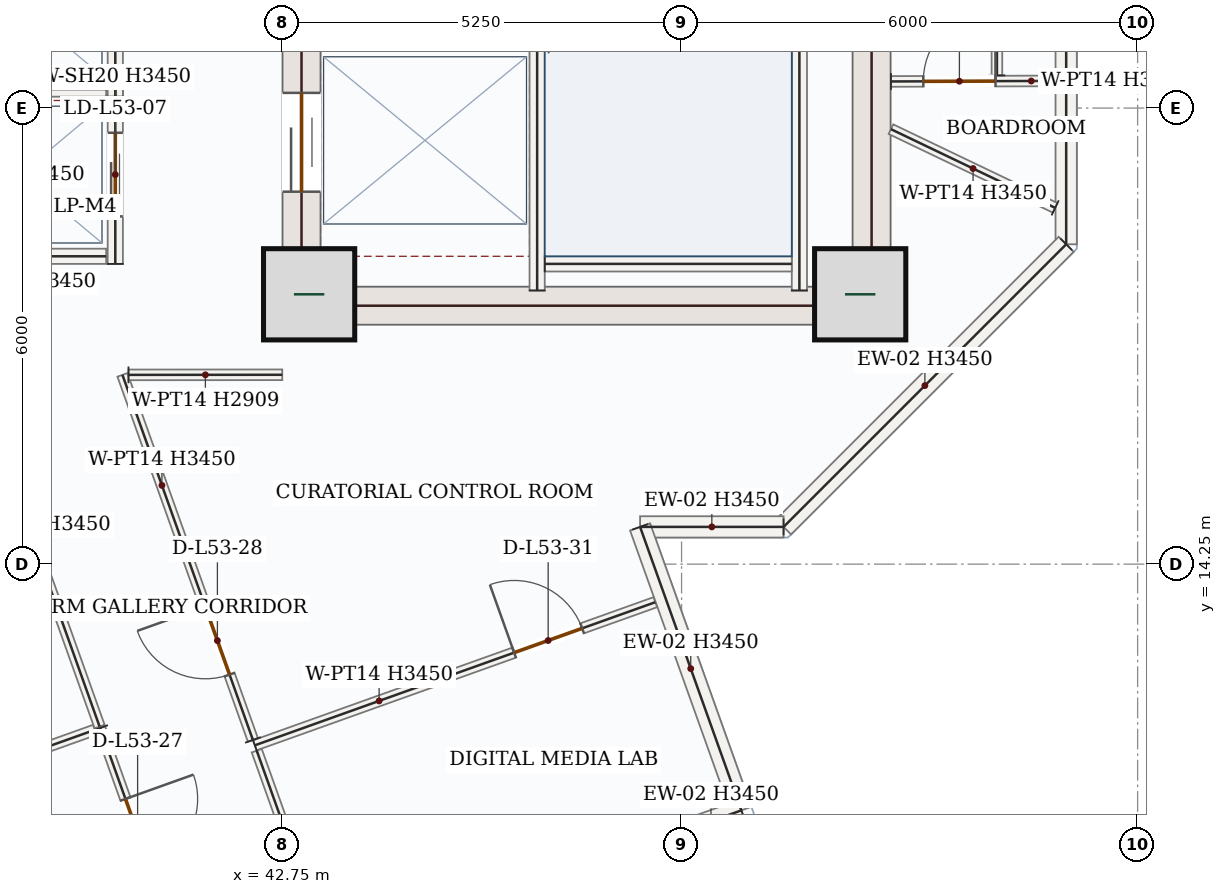
"""IFC4 building model, lengths in metres.
Left out: names, types, materials, properties, quantities, classifications, styles, units other than length and angle.
Written with IfcOpenShell. Run it as: python <this file> out.ifc"""

import sys

from ifc_helpers import new_model, si_unit, direction, frame, frame_2d, origin, origin_2d, place, context, subcontext, project, spatial, rectangle, extrude, source, transform, mapped, element, fill, save


model = new_model("IFC4")
c1 = context("Model", 3, precision=1e-05, world=origin(), true_north=direction((0.0, 1.0)))
c2 = subcontext(c1, "Body", "Model", "MODEL_VIEW")
j1 = project(units=[si_unit("LENGTHUNIT", "METRE"), si_unit("PLANEANGLEUNIT", "RADIAN")], contexts=[c1])
p1 = place(None, origin())
s1 = spatial("IfcSite", under=j1, at=p1, CompositionType="ELEMENT")
p2 = place(p1, origin())
s2 = spatial("IfcBuilding", under=s1, at=p2, CompositionType="ELEMENT")
p3 = place(p2, frame((0.0, 0.0, 225.3)))
s3 = spatial("IfcBuildingStorey", under=s2, at=p3, CompositionType="ELEMENT", Elevation=225.3)
p4 = place(p3, frame((43.0, 17.4, 0.0), z_axis=(0.0, 0.0, 1.0), x_axis=(0.0, 1.0, 0.0)))
e1 = element("IfcWall", 1, at=p4, inside=s3, PredefinedType="SHEAR", context=c2, shape_type="SweptSolid", body=[
    extrude(rectangle(XDim=8.55, YDim=0.5, at=frame_2d((4.275, 0.0))), origin(), (0.0, 0.0, 1.0), 3.45),
])
p5 = place(p4, frame((6.65, 0.0, 0.0)))
e2 = element("IfcOpeningElement", 2, at=p5, cuts=e1, PredefinedType="OPENING", context=c2, shape_type="SweptSolid", body=[
    extrude(rectangle(XDim=1.1, YDim=2.2, at=frame_2d((0.55, 1.1))), frame((0.0, 0.26, 0.0), z_axis=(0.0, -1.0, 0.0), x_axis=(1.0, 0.0, 0.0)), (0.0, 0.0, 1.0), 0.52),
])
p6 = place(p4, frame((1.75, 0.0, 0.0)))
e3 = element("IfcOpeningElement", 3, at=p6, cuts=e1, PredefinedType="OPENING", context=c2, shape_type="SweptSolid", body=[
    extrude(rectangle(XDim=1.3, YDim=2.2, at=frame_2d((0.65, 1.1))), frame((0.0, 0.26, 0.0), z_axis=(0.0, -1.0, 0.0), x_axis=(1.0, 0.0, 0.0)), (0.0, 0.0, 1.0), 0.52),
])
p7 = place(p4, frame((4.55, 0.0, 0.0)))
e4 = element("IfcOpeningElement", 4, at=p7, cuts=e1, PredefinedType="OPENING", context=c2, shape_type="SweptSolid", body=[
    extrude(rectangle(XDim=0.88, YDim=2.1, at=frame_2d((0.44, 1.05))), frame((0.0, 0.26, 0.0), z_axis=(0.0, -1.0, 0.0), x_axis=(1.0, 0.0, 0.0)), (0.0, 0.0, 1.0), 0.52),
])
m1 = source(origin(), c2, "Body", "SweptSolid", [
    extrude(rectangle(XDim=8.55, YDim=0.5, at=frame_2d((4.275, 0.0))), origin(), (0.0, 0.0, 1.0), 3.45),
])
p8 = place(p3, frame((50.5, 17.4, 0.0), z_axis=(0.0, 0.0, 1.0), x_axis=(0.0, 1.0, 0.0)))
e5 = element("IfcWall", 5, at=p8, inside=s3, PredefinedType="SHEAR", context=c2, shape_type="MappedRepresentation", body=[
    mapped(m1, transform((0.0, 0.0, 0.0), x_axis=(1.0, 0.0, 0.0), y_axis=(0.0, 1.0, 0.0), z_axis=(0.0, 0.0, 1.0), scale=1.0)),
])
m2 = source(origin(), c2, "Body", "SweptSolid", [
    extrude(rectangle(XDim=7.0, YDim=0.5, at=frame_2d((3.5, 0.0))), origin(), (0.0, 0.0, 1.0), 3.45),
])
p9 = place(p3, frame((43.25, 17.65, 0.0), z_axis=(0.0, 0.0, 1.0), x_axis=(1.0, 0.0, 0.0)))
e6 = element("IfcWall", 6, at=p9, inside=s3, PredefinedType="SHEAR", context=c2, shape_type="MappedRepresentation", body=[
    mapped(m2, transform((0.0, 0.0, 0.0), x_axis=(1.0, 0.0, 0.0), y_axis=(0.0, 1.0, 0.0), z_axis=(0.0, 0.0, 1.0), scale=1.0)),
])
m3 = source(origin(), c2, "Body", "SweptSolid", [
    extrude(rectangle(XDim=1.2, YDim=1.2, at=origin_2d()), origin(), (0.0, 0.0, 1.0), 3.9),
])
for number, where, z_axis, x_axis in (
    (7, (43.1, 17.8, 0.0), (0.0, 0.0, 1.0), (1.0, 0.0, 0.0)),
    (8, (50.35, 17.8, 0.0), (0.0, 0.0, 1.0), (1.0, 0.0, 0.0)),
):
    element("IfcColumn", number, at=place(p3, frame(where, z_axis=z_axis, x_axis=x_axis)), inside=s3, PredefinedType="COLUMN", context=c2, shape_type="MappedRepresentation", body=[
        mapped(m3, transform((0.0, 0.0, 0.0), x_axis=(1.0, 0.0, 0.0), y_axis=(0.0, 1.0, 0.0), z_axis=(0.0, 0.0, 1.0), scale=1.0)),
    ])
m4 = source(origin(), c2, "Body", "SweptSolid", [
    extrude(rectangle(XDim=7.567, YDim=0.28, at=frame_2d((3.783, 0.0))), origin(), (0.0, 0.0, 1.0), 3.45),
])
p10 = place(p3, frame((53.06, 26.025, 0.0), z_axis=(0.0, 0.0, 1.0), x_axis=(0.0, -1.0, 0.0)))
e9 = element("IfcWall", 9, at=p10, inside=s3, PredefinedType="SOLIDWALL", context=c2, shape_type="MappedRepresentation", body=[
    mapped(m4, transform((0.0, 0.0, 0.0), x_axis=(1.0, 0.0, 0.0), y_axis=(0.0, 1.0, 0.0), z_axis=(0.0, 0.0, 1.0), scale=1.0)),
])
m5 = source(origin(), c2, "Body", "SweptSolid", [
    extrude(rectangle(XDim=5.258, YDim=0.28, at=frame_2d((2.629, 0.0))), origin(), (0.0, 0.0, 1.0), 3.45),
])
p11 = place(p3, frame((53.06, 18.458, 0.0), z_axis=(0.0, 0.0, 1.0), x_axis=(-0.707106781187, -0.707106781187, 0.0)))
e10 = element("IfcWall", 10, at=p11, inside=s3, PredefinedType="SOLIDWALL", context=c2, shape_type="MappedRepresentation", body=[
    mapped(m5, transform((0.0, 0.0, 0.0), x_axis=(1.0, 0.0, 0.0), y_axis=(0.0, 1.0, 0.0), z_axis=(0.0, 0.0, 1.0), scale=1.0)),
])
m6 = source(origin(), c2, "Body", "SweptSolid", [
    extrude(rectangle(XDim=1.888, YDim=0.28, at=frame_2d((0.944, 0.0))), origin(), (0.0, 0.0, 1.0), 3.45),
])
p12 = place(p3, frame((49.342, 14.74, 0.0), z_axis=(0.0, 0.0, 1.0), x_axis=(-1.0, 0.0, 0.0)))
e11 = element("IfcWall", 11, at=p12, inside=s3, PredefinedType="SOLIDWALL", context=c2, shape_type="MappedRepresentation", body=[
    mapped(m6, transform((0.0, 0.0, 0.0), x_axis=(1.0, 0.0, 0.0), y_axis=(0.0, 1.0, 0.0), z_axis=(0.0, 0.0, 1.0), scale=1.0)),
])
m7 = source(origin(), c2, "Body", "SweptSolid", [
    extrude(rectangle(XDim=3.96, YDim=0.28, at=frame_2d((1.98, 0.0))), origin(), (0.0, 0.0, 1.0), 3.45),
])
p13 = place(p3, frame((47.454, 14.74, 0.0), z_axis=(0.0, 0.0, 1.0), x_axis=(0.336590223561, -0.941651220677, 0.0)))
e12 = element("IfcWall", 12, at=p13, inside=s3, PredefinedType="SOLIDWALL", context=c2, shape_type="MappedRepresentation", body=[
    mapped(m7, transform((0.0, 0.0, 0.0), x_axis=(1.0, 0.0, 0.0), y_axis=(0.0, 1.0, 0.0), z_axis=(0.0, 0.0, 1.0), scale=1.0)),
])
m8 = source(origin(), c2, "Body", "SweptSolid", [
    extrude(rectangle(XDim=0.85, YDim=0.28, at=frame_2d((0.425, 0.0))), origin(), (0.0, 0.0, 1.0), 3.45),
])
p14 = place(p3, frame((48.787, 11.011, 0.0), z_axis=(0.0, 0.0, 1.0), x_axis=(-0.941657417713, -0.336572886112, 0.0)))
e13 = element("IfcWall", 13, at=p14, inside=s3, PredefinedType="SOLIDWALL", context=c2, shape_type="MappedRepresentation", body=[
    mapped(m8, transform((0.0, 0.0, 0.0), x_axis=(1.0, 0.0, 0.0), y_axis=(0.0, 1.0, 0.0), z_axis=(0.0, 0.0, 1.0), scale=1.0)),
])
m9 = source(origin(), c2, "Body", "SweptSolid", [
    extrude(rectangle(XDim=7.87, YDim=0.2, at=frame_2d((3.935, 0.0))), origin(), (0.0, 0.0, 1.0), 3.45),
])
p15 = place(p3, frame((49.55, 17.85, 0.0), z_axis=(0.0, 0.0, 1.0), x_axis=(0.0, 1.0, 0.0)))
e14 = element("IfcWall", 14, at=p15, inside=s3, PredefinedType="SOLIDWALL", context=c2, shape_type="MappedRepresentation", body=[
    mapped(m9, transform((0.0, 0.0, 0.0), x_axis=(1.0, 0.0, 0.0), y_axis=(0.0, 1.0, 0.0), z_axis=(0.0, 0.0, 1.0), scale=1.0)),
])
p16 = place(p3, frame((46.1, 17.85, 0.0), z_axis=(0.0, 0.0, 1.0), x_axis=(0.0, 1.0, 0.0)))
e15 = element("IfcWall", 15, at=p16, inside=s3, PredefinedType="SOLIDWALL", context=c2, shape_type="SweptSolid", body=[
    extrude(rectangle(XDim=8.0, YDim=0.2, at=frame_2d((4.0, 0.0))), origin(), (0.0, 0.0, 1.0), 3.45),
])
p17 = place(p16, frame((6.3, 0.0, 0.0)))
e16 = element("IfcOpeningElement", 16, at=p17, cuts=e15, PredefinedType="OPENING", context=c2, shape_type="SweptSolid", body=[
    extrude(rectangle(XDim=1.05, YDim=2.15, at=frame_2d((0.525, 1.075))), frame((0.0, 0.11, 0.0), z_axis=(0.0, -1.0, 0.0), x_axis=(1.0, 0.0, 0.0)), (0.0, 0.0, 1.0), 0.22),
])
m10 = source(origin(), c2, "Body", "SweptSolid", [
    extrude(rectangle(XDim=3.25, YDim=0.2, at=frame_2d((1.625, 0.0))), origin(), (0.0, 0.0, 1.0), 3.45),
])
p18 = place(p3, frame((46.2, 18.2, 0.0), z_axis=(0.0, 0.0, 1.0), x_axis=(1.0, 0.0, 0.0)))
e17 = element("IfcWall", 17, at=p18, inside=s3, PredefinedType="SOLIDWALL", context=c2, shape_type="MappedRepresentation", body=[
    mapped(m10, transform((0.0, 0.0, 0.0), x_axis=(1.0, 0.0, 0.0), y_axis=(0.0, 1.0, 0.0), z_axis=(0.0, 0.0, 1.0), scale=1.0)),
])
p19 = place(p3, frame((40.55, 20.4, 0.0), z_axis=(0.0, 0.0, 1.0), x_axis=(0.0, 1.0, 0.0)))
e18 = element("IfcWall", 18, at=p19, inside=s3, PredefinedType="SOLIDWALL", context=c2, shape_type="SweptSolid", body=[
    extrude(rectangle(XDim=2.35, YDim=0.2, at=frame_2d((1.175, 0.0))), origin(), (0.0, 0.0, 1.0), 3.45),
])
p20 = place(p19, frame((0.625, 0.0, 0.0)))
e19 = element("IfcOpeningElement", 19, at=p20, cuts=e18, PredefinedType="OPENING", context=c2, shape_type="SweptSolid", body=[
    extrude(rectangle(XDim=1.1, YDim=2.15, at=frame_2d((0.55, 1.075))), frame((0.0, 0.11, 0.0), z_axis=(0.0, -1.0, 0.0), x_axis=(1.0, 0.0, 0.0)), (0.0, 0.0, 1.0), 0.22),
])
m11 = source(origin(), c2, "Body", "SweptSolid", [
    extrude(rectangle(XDim=2.26, YDim=0.2, at=frame_2d((1.13, 0.0))), origin(), (0.0, 0.0, 1.0), 3.45),
])
p21 = place(p3, frame((38.17, 20.5, 0.0), z_axis=(0.0, 0.0, 1.0), x_axis=(1.0, 0.0, 0.0)))
e20 = element("IfcWall", 20, at=p21, inside=s3, PredefinedType="SOLIDWALL", context=c2, shape_type="MappedRepresentation", body=[
    mapped(m11, transform((0.0, 0.0, 0.0), x_axis=(1.0, 0.0, 0.0), y_axis=(0.0, 1.0, 0.0), z_axis=(0.0, 0.0, 1.0), scale=1.0)),
])
p22 = place(p3, frame((40.55, 18.2, 0.0), z_axis=(0.0, 0.0, 1.0), x_axis=(0.0, 1.0, 0.0)))
e21 = element("IfcWall", 21, at=p22, inside=s3, PredefinedType="SOLIDWALL", context=c2, shape_type="SweptSolid", body=[
    extrude(rectangle(XDim=2.35, YDim=0.2, at=frame_2d((1.175, 0.0))), origin(), (0.0, 0.0, 1.0), 3.45),
])
p23 = place(p22, frame((0.625, 0.0, 0.0)))
e22 = element("IfcOpeningElement", 22, at=p23, cuts=e21, PredefinedType="OPENING", context=c2, shape_type="SweptSolid", body=[
    extrude(rectangle(XDim=1.1, YDim=2.15, at=frame_2d((0.55, 1.075))), frame((0.0, 0.11, 0.0), z_axis=(0.0, -1.0, 0.0), x_axis=(1.0, 0.0, 0.0)), (0.0, 0.0, 1.0), 0.22),
])
p24 = place(p3, frame((38.17, 18.3, 0.0), z_axis=(0.0, 0.0, 1.0), x_axis=(1.0, 0.0, 0.0)))
e23 = element("IfcWall", 23, at=p24, inside=s3, PredefinedType="SOLIDWALL", context=c2, shape_type="MappedRepresentation", body=[
    mapped(m11, transform((0.0, 0.0, 0.0), x_axis=(1.0, 0.0, 0.0), y_axis=(0.0, 1.0, 0.0), z_axis=(0.0, 0.0, 1.0), scale=1.0)),
])
p25 = place(p3, frame((50.755, 20.6, 0.0), z_axis=(0.0, 0.0, 1.0), x_axis=(0.999994277874, 0.003382930575, 0.0)))
e24 = element("IfcWall", 24, at=p25, inside=s3, PredefinedType="PARTITIONING", context=c2, shape_type="SweptSolid", body=[
    extrude(rectangle(XDim=2.165, YDim=0.14, at=frame_2d((1.083, 0.0))), origin(), (0.0, 0.0, 1.0), 3.45),
])
p26 = place(p25, frame((0.425, 0.0, 0.0)))
e25 = element("IfcOpeningElement", 25, at=p26, cuts=e24, PredefinedType="OPENING", context=c2, shape_type="SweptSolid", body=[
    extrude(rectangle(XDim=0.95, YDim=2.15, at=frame_2d((0.475, 1.075))), frame((0.0, 0.08, 0.0), z_axis=(0.0, -1.0, 0.0), x_axis=(1.0, 0.0, 0.0)), (0.0, 0.0, 1.0), 0.16),
])
m12 = source(origin(), c2, "Body", "SweptSolid", [
    extrude(rectangle(XDim=9.038, YDim=0.14, at=frame_2d((4.519, 0.0))), origin(), (0.0, 0.0, 1.0), 2.523),
])
p27 = place(p3, frame((52.149, 20.68, 0.0), z_axis=(0.0, 0.0, 1.0), x_axis=(0.000135065776, 0.999999990879, 0.0)))
e26 = element("IfcWall", 26, at=p27, inside=s3, PredefinedType="PARTITIONING", context=c2, shape_type="MappedRepresentation", body=[
    mapped(m12, transform((0.0, 0.0, 0.0), x_axis=(1.0, 0.0, 0.0), y_axis=(0.0, 1.0, 0.0), z_axis=(0.0, 0.0, 1.0), scale=1.0)),
])
m13 = source(origin(), c2, "Body", "SweptSolid", [
    extrude(rectangle(XDim=2.395, YDim=0.14, at=frame_2d((1.198, 0.0))), origin(), (0.0, 0.0, 1.0), 3.45),
])
p28 = place(p3, frame((52.915, 18.937, 0.0), z_axis=(0.0, 0.0, 1.0), x_axis=(-0.90180278892, 0.432147810242, 0.0)))
e27 = element("IfcWall", 27, at=p28, inside=s3, PredefinedType="PARTITIONING", context=c2, shape_type="MappedRepresentation", body=[
    mapped(m13, transform((0.0, 0.0, 0.0), x_axis=(1.0, 0.0, 0.0), y_axis=(0.0, 1.0, 0.0), z_axis=(0.0, 0.0, 1.0), scale=1.0)),
])
p29 = place(p3, frame((42.386, 11.866, 0.0), z_axis=(0.0, 0.0, 1.0), x_axis=(0.94166093099, 0.336563056568, 0.0)))
e28 = element("IfcWall", 28, at=p29, inside=s3, PredefinedType="PARTITIONING", context=c2, shape_type="SweptSolid", body=[
    extrude(rectangle(XDim=5.595, YDim=0.14, at=frame_2d((2.797, 0.0))), origin(), (0.0, 0.0, 1.0), 3.45),
])
p30 = place(p29, frame((3.623, 0.0, 0.0)))
e29 = element("IfcOpeningElement", 29, at=p30, cuts=e28, PredefinedType="OPENING", context=c2, shape_type="SweptSolid", body=[
    extrude(rectangle(XDim=0.95, YDim=2.15, at=frame_2d((0.475, 1.075))), frame((0.0, 0.08, 0.0), z_axis=(0.0, -1.0, 0.0), x_axis=(1.0, 0.0, 0.0)), (0.0, 0.0, 1.0), 0.16),
])
m14 = source(origin(), c2, "Body", "SweptSolid", [
    extrude(rectangle(XDim=4.48, YDim=0.14, at=frame_2d((2.24, 0.0))), origin(), (0.0, 0.0, 1.0), 3.45),
])
p31 = place(p3, frame((43.919, 7.577, 0.0), z_axis=(0.0, 0.0, 1.0), x_axis=(-0.336557324255, 0.941662979781, 0.0)))
e30 = element("IfcWall", 30, at=p31, inside=s3, PredefinedType="PARTITIONING", context=c2, shape_type="MappedRepresentation", body=[
    mapped(m14, transform((0.0, 0.0, 0.0), x_axis=(1.0, 0.0, 0.0), y_axis=(0.0, 1.0, 0.0), z_axis=(0.0, 0.0, 1.0), scale=1.0)),
])
p32 = place(p3, frame((40.35, 12.094, 0.0), z_axis=(0.0, 0.0, 1.0), x_axis=(0.336563203689, -0.941660878407, 0.0)))
e31 = element("IfcWall", 31, at=p32, inside=s3, PredefinedType="PARTITIONING", context=c2, shape_type="SweptSolid", body=[
    extrude(rectangle(XDim=5.455, YDim=0.14, at=frame_2d((2.728, 0.0))), origin(), (0.0, 0.0, 1.0), 3.45),
])
p33 = place(p32, frame((0.991, 0.0, 0.0)))
e32 = element("IfcOpeningElement", 32, at=p33, cuts=e31, PredefinedType="OPENING", context=c2, shape_type="SweptSolid", body=[
    extrude(rectangle(XDim=0.95, YDim=2.15, at=frame_2d((0.475, 1.075))), frame((0.0, 0.08, 0.0), z_axis=(0.0, -1.0, 0.0), x_axis=(1.0, 0.0, 0.0)), (0.0, 0.0, 1.0), 0.16),
])
m15 = source(origin(), c2, "Body", "SweptSolid", [
    extrude(rectangle(XDim=3.774, YDim=0.14, at=frame_2d((1.887, 0.0))), origin(), (0.0, 0.0, 1.0), 3.45),
])
p34 = place(p3, frame((36.725, 10.799, 0.0), z_axis=(0.0, 0.0, 1.0), x_axis=(0.94166578898, 0.336549464216, 0.0)))
e33 = element("IfcWall", 33, at=p34, inside=s3, PredefinedType="PARTITIONING", context=c2, shape_type="MappedRepresentation", body=[
    mapped(m15, transform((0.0, 0.0, 0.0), x_axis=(1.0, 0.0, 0.0), y_axis=(0.0, 1.0, 0.0), z_axis=(0.0, 0.0, 1.0), scale=1.0)),
])
m16 = source(origin(), c2, "Body", "SweptSolid", [
    extrude(rectangle(XDim=4.913, YDim=0.14, at=frame_2d((2.457, 0.0))), origin(), (0.0, 0.0, 1.0), 3.45),
])
p35 = place(p3, frame((38.69, 16.74, 0.0), z_axis=(0.0, 0.0, 1.0), x_axis=(0.336547288081, -0.941666566724, 0.0)))
e34 = element("IfcWall", 34, at=p35, inside=s3, PredefinedType="PARTITIONING", context=c2, shape_type="MappedRepresentation", body=[
    mapped(m16, transform((0.0, 0.0, 0.0), x_axis=(1.0, 0.0, 0.0), y_axis=(0.0, 1.0, 0.0), z_axis=(0.0, 0.0, 1.0), scale=1.0)),
])
p36 = place(p3, frame((42.361, 11.937, 0.0), z_axis=(0.0, 0.0, 1.0), x_axis=(-0.336588056289, 0.941651995359, 0.0)))
e35 = element("IfcWall", 35, at=p36, inside=s3, PredefinedType="PARTITIONING", context=c2, shape_type="SweptSolid", body=[
    extrude(rectangle(XDim=5.101, YDim=0.14, at=frame_2d((2.55, 0.0))), origin(), (0.0, 0.0, 1.0), 3.45),
])
p37 = place(p36, frame((0.913, 0.0, 0.0)))
e36 = element("IfcOpeningElement", 36, at=p37, cuts=e35, PredefinedType="OPENING", context=c2, shape_type="SweptSolid", body=[
    extrude(rectangle(XDim=0.95, YDim=2.15, at=frame_2d((0.475, 1.075))), frame((0.0, 0.08, 0.0), z_axis=(0.0, -1.0, 0.0), x_axis=(1.0, 0.0, 0.0)), (0.0, 0.0, 1.0), 0.16),
])
m17 = source(origin(), c2, "Body", "SweptSolid", [
    extrude(rectangle(XDim=2.023, YDim=0.14, at=frame_2d((1.012, 0.0))), origin(), (0.0, 0.0, 1.0), 2.909),
])
p38 = place(p3, frame((40.723, 16.74, 0.0), z_axis=(0.0, 0.0, 1.0), x_axis=(0.999999817982, 0.000603354542, 0.0)))
e37 = element("IfcWall", 37, at=p38, inside=s3, PredefinedType="PARTITIONING", context=c2, shape_type="MappedRepresentation", body=[
    mapped(m17, transform((0.0, 0.0, 0.0), x_axis=(1.0, 0.0, 0.0), y_axis=(0.0, 1.0, 0.0), z_axis=(0.0, 0.0, 1.0), scale=1.0)),
])
m18 = source(origin(), c2, "Body", "SweptSolid", [
    extrude(rectangle(XDim=1.3, YDim=2.2, at=frame_2d((0.65, 1.1))), frame((0.0, 0.025, 0.0), z_axis=(0.0, -1.0, 0.0), x_axis=(1.0, 0.0, 0.0)), (0.0, 0.0, 1.0), 0.05),
])
p39 = place(p6, origin())
e38 = element("IfcDoor", 38, at=p39, inside=s3, OperationType="DOUBLE_DOOR_SLIDING", PredefinedType="DOOR", context=c2, shape_type="MappedRepresentation", body=[
    mapped(m18, transform((0.0, 0.0, 0.0), x_axis=(1.0, 0.0, 0.0), y_axis=(0.0, 1.0, 0.0), z_axis=(0.0, 0.0, 1.0), scale=1.0)),
])
fill(e3, e38)
m19 = source(origin(), c2, "Body", "SweptSolid", [
    extrude(rectangle(XDim=1.1, YDim=2.15, at=frame_2d((0.55, 1.075))), frame((0.0, 0.025, 0.0), z_axis=(0.0, -1.0, 0.0), x_axis=(1.0, 0.0, 0.0)), (0.0, 0.0, 1.0), 0.05),
])
p40 = place(p23, origin())
e39 = element("IfcDoor", 39, at=p40, inside=s3, OperationType="DOUBLE_DOOR_SLIDING", PredefinedType="DOOR", context=c2, shape_type="MappedRepresentation", body=[
    mapped(m19, transform((0.0, 0.0, 0.0), x_axis=(1.0, 0.0, 0.0), y_axis=(0.0, 1.0, 0.0), z_axis=(0.0, 0.0, 1.0), scale=1.0)),
])
fill(e22, e39)
m20 = source(origin(), c2, "Body", "SweptSolid", [
    extrude(rectangle(XDim=0.95, YDim=2.15, at=frame_2d((0.475, 1.075))), frame((0.0, 0.025, 0.0), z_axis=(0.0, -1.0, 0.0), x_axis=(1.0, 0.0, 0.0)), (0.0, 0.0, 1.0), 0.05),
])
p41 = place(p26, origin())
e40 = element("IfcDoor", 40, at=p41, inside=s3, OperationType="SINGLE_SWING_RIGHT", PredefinedType="DOOR", context=c2, shape_type="MappedRepresentation", body=[
    mapped(m20, transform((0.0, 0.0, 0.0), x_axis=(1.0, 0.0, 0.0), y_axis=(0.0, 1.0, 0.0), z_axis=(0.0, 0.0, 1.0), scale=1.0)),
])
fill(e25, e40)
p42 = place(p33, origin())
e41 = element("IfcDoor", 41, at=p42, inside=s3, OperationType="SINGLE_SWING_LEFT", PredefinedType="DOOR", context=c2, shape_type="MappedRepresentation", body=[
    mapped(m20, transform((0.0, 0.0, 0.0), x_axis=(1.0, 0.0, 0.0), y_axis=(0.0, 1.0, 0.0), z_axis=(0.0, 0.0, 1.0), scale=1.0)),
])
fill(e32, e41)
p43 = place(p37, origin())
e42 = element("IfcDoor", 42, at=p43, inside=s3, OperationType="SINGLE_SWING_RIGHT", PredefinedType="DOOR", context=c2, shape_type="MappedRepresentation", body=[
    mapped(m20, transform((0.0, 0.0, 0.0), x_axis=(1.0, 0.0, 0.0), y_axis=(0.0, 1.0, 0.0), z_axis=(0.0, 0.0, 1.0), scale=1.0)),
])
fill(e36, e42)
p44 = place(p30, origin())
e43 = element("IfcDoor", 43, at=p44, inside=s3, OperationType="SINGLE_SWING_LEFT", PredefinedType="DOOR", context=c2, shape_type="MappedRepresentation", body=[
    mapped(m20, transform((0.0, 0.0, 0.0), x_axis=(1.0, 0.0, 0.0), y_axis=(0.0, 1.0, 0.0), z_axis=(0.0, 0.0, 1.0), scale=1.0)),
])
fill(e29, e43)
save(model, sys.argv[1])
